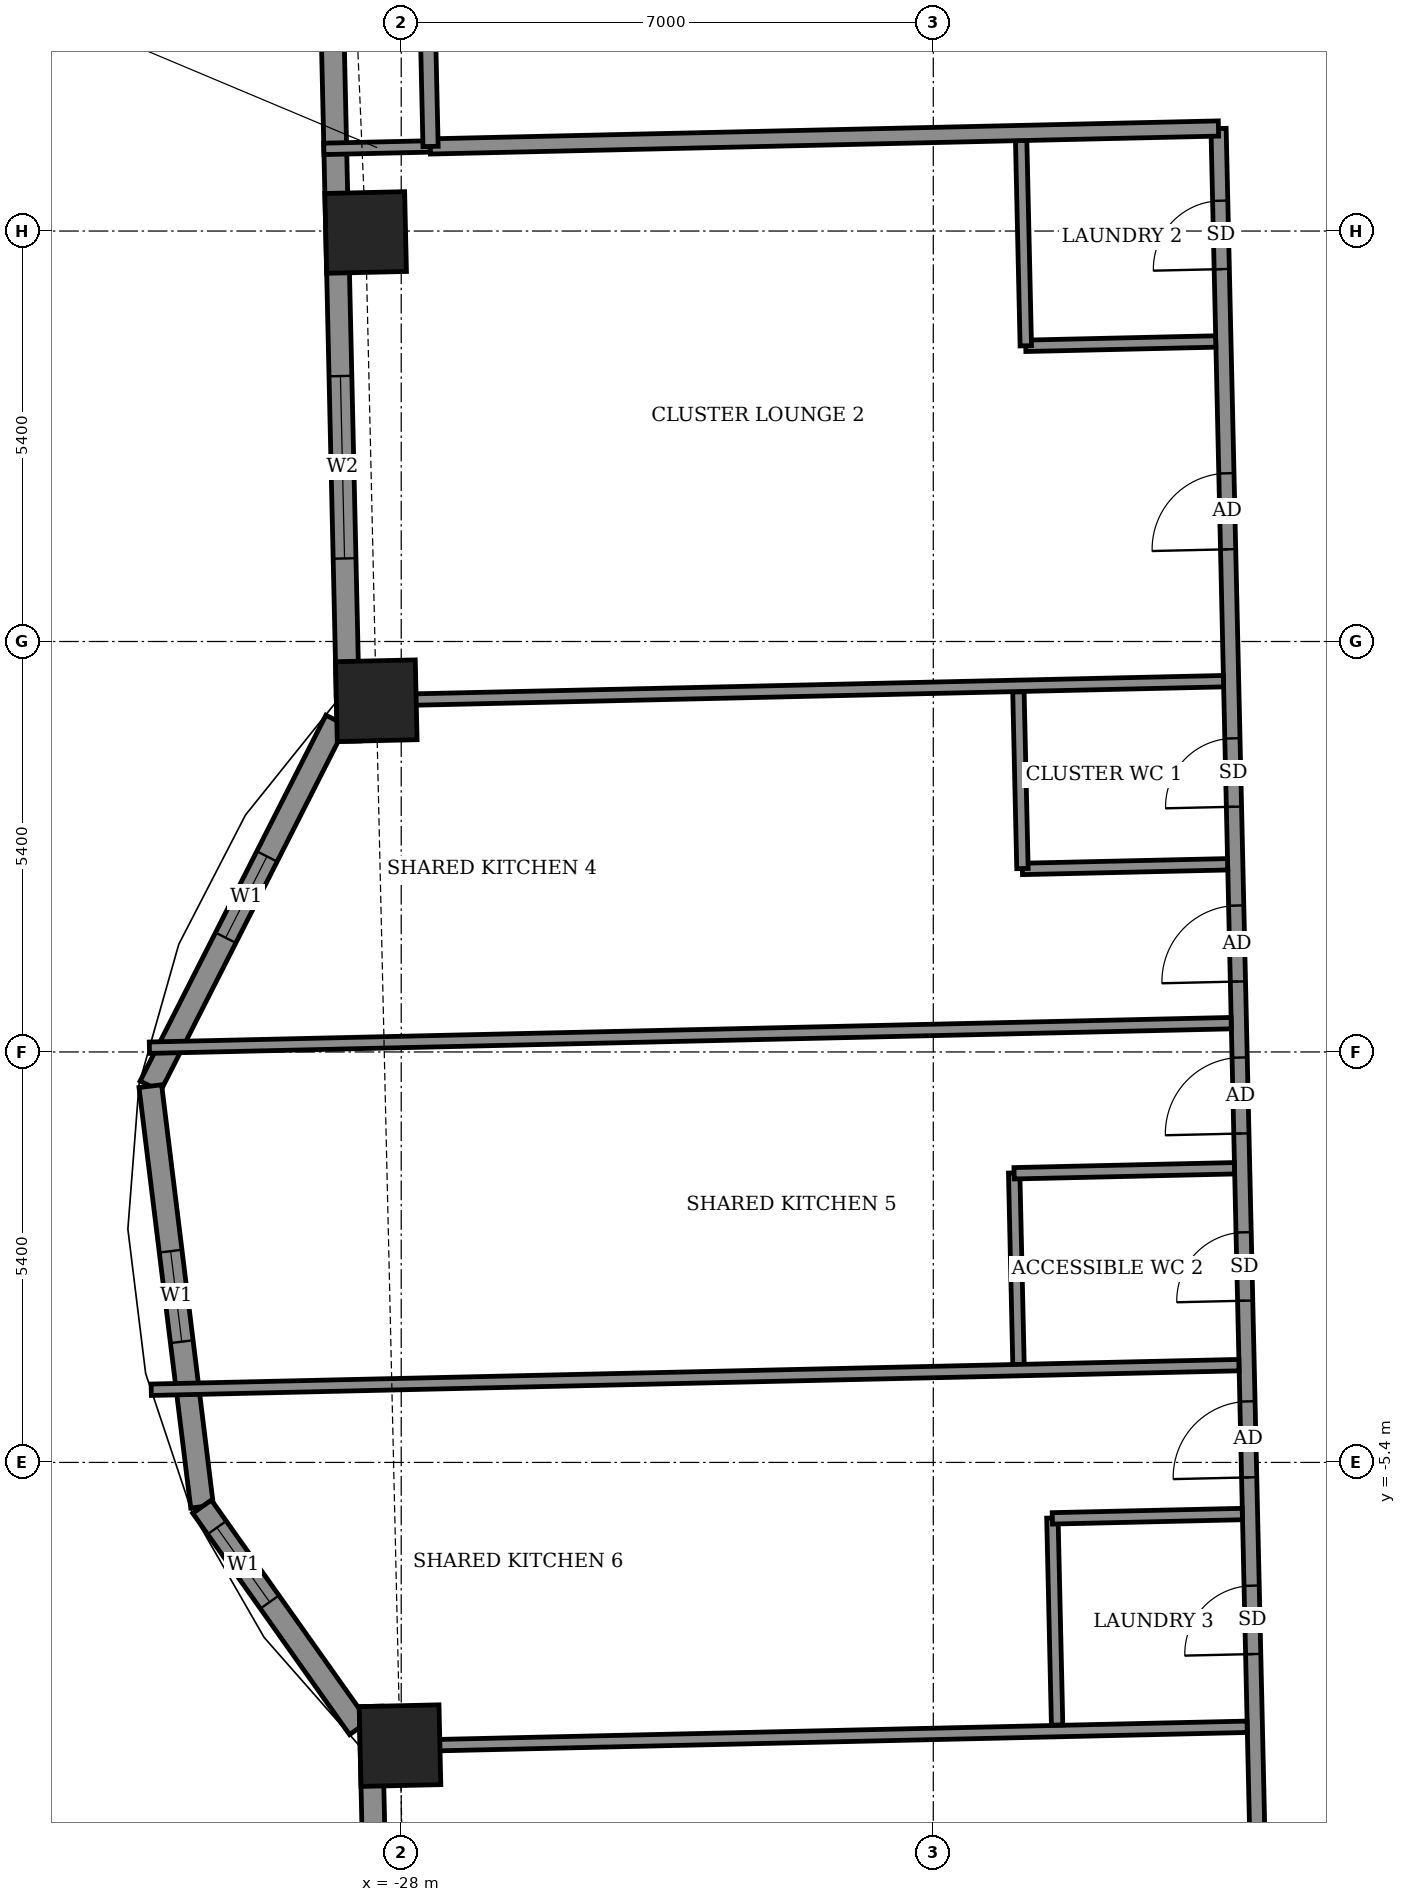
"""IFC4 building model, lengths in metres.
Left out: names, types, materials, properties, quantities, classifications, styles, units other than length and angle.
Written with IfcOpenShell. Run it as: python <this file> out.ifc"""

import sys

from ifc_helpers import new_model, si_unit, direction, frame, frame_2d, origin, origin_2d, place, context, subcontext, project, spatial, rectangle, extrude, element, fill, save


model = new_model("IFC4")
c1 = context("Model", 3, precision=1e-05, world=origin(), true_north=direction((0.0, 1.0)))
c2 = subcontext(c1, "Body", "Model", "MODEL_VIEW")
j1 = project(units=[si_unit("LENGTHUNIT", "METRE"), si_unit("PLANEANGLEUNIT", "RADIAN")], contexts=[c1])
p1 = place(None, origin())
s1 = spatial("IfcSite", under=j1, at=p1, CompositionType="ELEMENT")
p2 = place(p1, origin())
s2 = spatial("IfcBuilding", under=s1, at=p2, CompositionType="ELEMENT")
p3 = place(p2, frame((0.0, 0.0, 241.9)))
s3 = spatial("IfcBuildingStorey", under=s2, at=p3, CompositionType="ELEMENT", Elevation=241.9)
for number, where, z_axis, x_axis in (
    (1, (-28.016, -9.126, -0.55), (0.0, 0.0, 1.0), (0.023, -1.0, 0.0)),
    (2, (-28.468, 10.781, -0.55), (0.0, 0.0, 1.0), (0.023, -1.0, 0.0)),
    (3, (-28.328, 4.621, -0.55), (0.0, 0.0, 1.0), (0.023, -1.0, 0.0)),
):
    element("IfcColumn", number, at=place(p3, frame(where, z_axis=z_axis, x_axis=x_axis)), inside=s3, PredefinedType="COLUMN", context=c2, shape_type="SweptSolid", body=[
        extrude(rectangle(XDim=1.05, YDim=1.05, at=origin_2d()), origin(), (0.0, 0.0, 1.0), 3.6),
    ])
p4 = place(p3, frame((-28.979, 16.784, 0.0), z_axis=(0.0, 0.0, 1.0), x_axis=(0.022685159264, -0.999742658662, 0.0)))
e4 = element("IfcWall", 4, at=p4, inside=s3, PredefinedType="SOLIDWALL", context=c2, shape_type="SweptSolid", body=[
    extrude(rectangle(XDim=12.699, YDim=0.3, at=frame_2d((6.35, 0.0))), origin(), (0.0, 0.0, 1.0), 2.55),
])
p5 = place(p4, frame((2.035, 0.0, 0.0)))
e5 = element("IfcOpeningElement", 5, at=p5, cuts=e4, PredefinedType="OPENING", context=c2, shape_type="SweptSolid", body=[
    extrude(rectangle(XDim=1.5, YDim=2.4, at=frame_2d((0.75, 1.2))), frame((0.0, 0.16, 0.0), z_axis=(0.0, -1.0, 0.0), x_axis=(1.0, 0.0, 0.0)), (0.0, 0.0, 1.0), 0.32),
])
p6 = place(p4, frame((7.894, 0.0, 0.9)))
e6 = element("IfcOpeningElement", 6, at=p6, cuts=e4, PredefinedType="OPENING", context=c2, shape_type="SweptSolid", body=[
    extrude(rectangle(XDim=2.4, YDim=1.5, at=frame_2d((1.2, 0.75))), frame((0.0, 0.16, 0.0), z_axis=(0.0, -1.0, 0.0), x_axis=(1.0, 0.0, 0.0)), (0.0, 0.0, 1.0), 0.32),
])
p7 = place(p3, frame((-28.857, 4.363, 0.0), z_axis=(0.0, 0.0, 1.0), x_axis=(-0.45277700056, -0.891623792731, 0.0)))
e7 = element("IfcWall", 7, at=p7, inside=s3, PredefinedType="SOLIDWALL", context=c2, shape_type="SweptSolid", body=[
    extrude(rectangle(XDim=5.398, YDim=0.3, at=frame_2d((2.699, 0.0))), origin(), (0.0, 0.0, 1.0), 3.05),
])
p8 = place(p7, frame((2.008, 0.0, 0.9)))
e8 = element("IfcOpeningElement", 8, at=p8, cuts=e7, PredefinedType="OPENING", context=c2, shape_type="SweptSolid", body=[
    extrude(rectangle(XDim=1.2, YDim=1.5, at=frame_2d((0.6, 0.75))), frame((0.0, 0.16, 0.0), z_axis=(0.0, -1.0, 0.0), x_axis=(1.0, 0.0, 0.0)), (0.0, 0.0, 1.0), 0.32),
])
p9 = place(p3, frame((-31.301, -0.45, 0.0), z_axis=(0.0, 0.0, 1.0), x_axis=(0.122163831021, -0.992509948761, 0.0)))
e9 = element("IfcWall", 9, at=p9, inside=s3, PredefinedType="SOLIDWALL", context=c2, shape_type="SweptSolid", body=[
    extrude(rectangle(XDim=5.574, YDim=0.3, at=frame_2d((2.787, 0.0))), origin(), (0.0, 0.0, 1.0), 3.05),
])
p10 = place(p9, frame((2.187, 0.0, 0.9)))
e10 = element("IfcOpeningElement", 10, at=p10, cuts=e9, PredefinedType="OPENING", context=c2, shape_type="SweptSolid", body=[
    extrude(rectangle(XDim=1.2, YDim=1.5, at=frame_2d((0.6, 0.75))), frame((0.0, 0.16, 0.0), z_axis=(0.0, -1.0, 0.0), x_axis=(1.0, 0.0, 0.0)), (0.0, 0.0, 1.0), 0.32),
])
p11 = place(p3, frame((-30.62, -5.982, 0.0), z_axis=(0.0, 0.0, 1.0), x_axis=(0.578108441206, -0.815959943996, 0.0)))
e11 = element("IfcWall", 11, at=p11, inside=s3, PredefinedType="SOLIDWALL", context=c2, shape_type="SweptSolid", body=[
    extrude(rectangle(XDim=3.569, YDim=0.3, at=frame_2d((1.784, 0.0))), origin(), (0.0, 0.0, 1.0), 3.05),
])
p12 = place(p11, frame((0.338, 0.0, 0.9)))
e12 = element("IfcOpeningElement", 12, at=p12, cuts=e11, PredefinedType="OPENING", context=c2, shape_type="SweptSolid", body=[
    extrude(rectangle(XDim=1.2, YDim=1.5, at=frame_2d((0.6, 0.75))), frame((0.0, 0.16, 0.0), z_axis=(0.0, -1.0, 0.0), x_axis=(1.0, 0.0, 0.0)), (0.0, 0.0, 1.0), 0.32),
])
p13 = place(p3, frame((-28.403, -8.61, 0.0), z_axis=(0.0, 0.0, 1.0), x_axis=(0.022680342038, -0.999742767958, 0.0)))
e13 = element("IfcWall", 13, at=p13, inside=s3, PredefinedType="SOLIDWALL", context=c2, shape_type="SweptSolid", body=[
    extrude(rectangle(XDim=13.1, YDim=0.3, at=frame_2d((6.55, 0.0))), origin(), (0.0, 0.0, 1.0), 2.55),
])
p14 = place(p13, frame((1.937, 0.0, 0.0)))
e14 = element("IfcOpeningElement", 14, at=p14, cuts=e13, PredefinedType="OPENING", context=c2, shape_type="SweptSolid", body=[
    extrude(rectangle(XDim=1.5, YDim=2.4, at=frame_2d((0.75, 1.2))), frame((0.0, 0.16, 0.0), z_axis=(0.0, -1.0, 0.0), x_axis=(1.0, 0.0, 0.0)), (0.0, 0.0, 1.0), 0.32),
])
p15 = place(p13, frame((8.611, 0.0, 0.9)))
e15 = element("IfcOpeningElement", 15, at=p15, cuts=e13, PredefinedType="OPENING", context=c2, shape_type="SweptSolid", body=[
    extrude(rectangle(XDim=2.4, YDim=1.5, at=frame_2d((1.2, 0.75))), frame((0.0, 0.16, 0.0), z_axis=(0.0, -1.0, 0.0), x_axis=(1.0, 0.0, 0.0)), (0.0, 0.0, 1.0), 0.32),
])
p16 = place(p3, frame((-31.652, 12.672, 0.0), z_axis=(0.0, 0.0, 1.0), x_axis=(-0.022611811187, 0.999744320311, 0.0)))
e16 = element("IfcWall", 16, at=p16, inside=s3, PredefinedType="USERDEFINED", context=c2, shape_type="SweptSolid", body=[
    extrude(rectangle(XDim=4.2, YDim=0.55, at=frame_2d((2.1, 0.0))), origin(), (0.0, 0.0, 1.0), 0.8),
])
p17 = place(p3, frame((-16.678, -12.919, 0.0), z_axis=(0.0, 0.0, 1.0), x_axis=(-0.022696191528, 0.999742408268, 0.0)))
e17 = element("IfcWall", 17, at=p17, inside=s3, PredefinedType="PARTITIONING", context=c2, shape_type="SweptSolid", body=[
    extrude(rectangle(XDim=25.074, YDim=0.2, at=frame_2d((12.537, 0.0))), origin(), (0.0, 0.0, 1.0), 3.05),
])
p18 = place(p17, frame((19.537, 0.0, 0.0)))
e18 = element("IfcOpeningElement", 18, at=p18, cuts=e17, PredefinedType="OPENING", context=c2, shape_type="SweptSolid", body=[
    extrude(rectangle(XDim=1.0, YDim=2.1, at=frame_2d((0.5, 1.05))), frame((0.0, 0.11, 0.0), z_axis=(0.0, -1.0, 0.0), x_axis=(1.0, 0.0, 0.0)), (0.0, 0.0, 1.0), 0.22),
])
p19 = place(p17, frame((23.224, 0.0, 0.0)))
e19 = element("IfcOpeningElement", 19, at=p19, cuts=e17, PredefinedType="OPENING", context=c2, shape_type="SweptSolid", body=[
    extrude(rectangle(XDim=0.9, YDim=2.1, at=frame_2d((0.45, 1.05))), frame((0.0, 0.11, 0.0), z_axis=(0.0, -1.0, 0.0), x_axis=(1.0, 0.0, 0.0)), (0.0, 0.0, 1.0), 0.22),
])
p20 = place(p17, frame((13.849, 0.0, 0.0)))
e20 = element("IfcOpeningElement", 20, at=p20, cuts=e17, PredefinedType="OPENING", context=c2, shape_type="SweptSolid", body=[
    extrude(rectangle(XDim=1.0, YDim=2.1, at=frame_2d((0.5, 1.05))), frame((0.0, 0.11, 0.0), z_axis=(0.0, -1.0, 0.0), x_axis=(1.0, 0.0, 0.0)), (0.0, 0.0, 1.0), 0.22),
])
p21 = place(p17, frame((16.149, 0.0, 0.0)))
e21 = element("IfcOpeningElement", 21, at=p21, cuts=e17, PredefinedType="OPENING", context=c2, shape_type="SweptSolid", body=[
    extrude(rectangle(XDim=0.9, YDim=2.1, at=frame_2d((0.45, 1.05))), frame((0.0, 0.11, 0.0), z_axis=(0.0, -1.0, 0.0), x_axis=(1.0, 0.0, 0.0)), (0.0, 0.0, 1.0), 0.22),
])
p22 = place(p17, frame((11.849, 0.0, 0.0)))
e22 = element("IfcOpeningElement", 22, at=p22, cuts=e17, PredefinedType="OPENING", context=c2, shape_type="SweptSolid", body=[
    extrude(rectangle(XDim=1.0, YDim=2.1, at=frame_2d((0.5, 1.05))), frame((0.0, 0.11, 0.0), z_axis=(0.0, -1.0, 0.0), x_axis=(1.0, 0.0, 0.0)), (0.0, 0.0, 1.0), 0.22),
])
p23 = place(p17, frame((9.649, 0.0, 0.0)))
e23 = element("IfcOpeningElement", 23, at=p23, cuts=e17, PredefinedType="OPENING", context=c2, shape_type="SweptSolid", body=[
    extrude(rectangle(XDim=0.9, YDim=2.1, at=frame_2d((0.45, 1.05))), frame((0.0, 0.11, 0.0), z_axis=(0.0, -1.0, 0.0), x_axis=(1.0, 0.0, 0.0)), (0.0, 0.0, 1.0), 0.22),
])
p24 = place(p17, frame((7.324, 0.0, 0.0)))
e24 = element("IfcOpeningElement", 24, at=p24, cuts=e17, PredefinedType="OPENING", context=c2, shape_type="SweptSolid", body=[
    extrude(rectangle(XDim=1.0, YDim=2.1, at=frame_2d((0.5, 1.05))), frame((0.0, 0.11, 0.0), z_axis=(0.0, -1.0, 0.0), x_axis=(1.0, 0.0, 0.0)), (0.0, 0.0, 1.0), 0.22),
])
p25 = place(p17, frame((4.999, 0.0, 0.0)))
e25 = element("IfcOpeningElement", 25, at=p25, cuts=e17, PredefinedType="OPENING", context=c2, shape_type="SweptSolid", body=[
    extrude(rectangle(XDim=0.9, YDim=2.1, at=frame_2d((0.45, 1.05))), frame((0.0, 0.11, 0.0), z_axis=(0.0, -1.0, 0.0), x_axis=(1.0, 0.0, 0.0)), (0.0, 0.0, 1.0), 0.22),
])
p26 = place(p3, frame((-28.241, -9.136, 0.0), z_axis=(0.0, 0.0, 1.0), x_axis=(0.999742533279, 0.022690684282, 0.0)))
e26 = element("IfcWall", 26, at=p26, inside=s3, PredefinedType="PARTITIONING", context=c2, shape_type="SweptSolid", body=[
    extrude(rectangle(XDim=11.373, YDim=0.15, at=frame_2d((5.687, 0.0))), origin(), (0.0, 0.0, 1.0), 3.05),
])
p27 = place(p3, frame((-19.371, -8.855, 0.0), z_axis=(0.0, 0.0, 1.0), x_axis=(-0.022760079124, 0.999740955847, 0.0)))
e27 = element("IfcWall", 27, at=p27, inside=s3, PredefinedType="PARTITIONING", context=c2, shape_type="SweptSolid", body=[
    extrude(rectangle(XDim=2.725, YDim=0.15, at=frame_2d((1.362, 0.0))), origin(), (0.0, 0.0, 1.0), 3.05),
])
p28 = place(p3, frame((-19.434, -6.136, 0.0), z_axis=(0.0, 0.0, 1.0), x_axis=(0.999741230352, 0.02274801823, 0.0)))
e28 = element("IfcWall", 28, at=p28, inside=s3, PredefinedType="PARTITIONING", context=c2, shape_type="SweptSolid", body=[
    extrude(rectangle(XDim=2.501, YDim=0.15, at=frame_2d((1.25, 0.0))), origin(), (0.0, 0.0, 1.0), 3.05),
])
p29 = place(p3, frame((-19.879, -4.115, 0.0), z_axis=(0.0, 0.0, 1.0), x_axis=(-0.022629142889, 0.99974392816, 0.0)))
e29 = element("IfcWall", 29, at=p29, inside=s3, PredefinedType="PARTITIONING", context=c2, shape_type="SweptSolid", body=[
    extrude(rectangle(XDim=2.525, YDim=0.15, at=frame_2d((1.262, 0.0))), origin(), (0.0, 0.0, 1.0), 3.05),
])
p30 = place(p3, frame((-31.289, -4.444, 0.0), z_axis=(0.0, 0.0, 1.0), x_axis=(0.99974382177, 0.022633842623, 0.0)))
e30 = element("IfcWall", 30, at=p30, inside=s3, PredefinedType="PARTITIONING", context=c2, shape_type="SweptSolid", body=[
    extrude(rectangle(XDim=14.314, YDim=0.15, at=frame_2d((7.157, 0.0))), origin(), (0.0, 0.0, 1.0), 2.1),
])
p31 = place(p3, frame((-19.937, -1.596, 0.0), z_axis=(0.0, 0.0, 1.0), x_axis=(0.999741574676, 0.022732880677, 0.0)))
e31 = element("IfcWall", 31, at=p31, inside=s3, PredefinedType="PARTITIONING", context=c2, shape_type="SweptSolid", body=[
    extrude(rectangle(XDim=2.9, YDim=0.15, at=frame_2d((1.45, 0.0))), origin(), (0.0, 0.0, 1.0), 3.05),
])
p32 = place(p3, frame((-31.313, 0.056, 0.0), z_axis=(0.0, 0.0, 1.0), x_axis=(0.999742561055, 0.022689460464, 0.0)))
e32 = element("IfcWall", 32, at=p32, inside=s3, PredefinedType="PARTITIONING", context=c2, shape_type="SweptSolid", body=[
    extrude(rectangle(XDim=14.236, YDim=0.15, at=frame_2d((7.118, 0.0))), origin(), (0.0, 0.0, 1.0), 2.1),
])
p33 = place(p3, frame((-19.828, 2.408, 0.0), z_axis=(0.0, 0.0, 1.0), x_axis=(0.99974458177, 0.022600248254, 0.0)))
e33 = element("IfcWall", 33, at=p33, inside=s3, PredefinedType="PARTITIONING", context=c2, shape_type="SweptSolid", body=[
    extrude(rectangle(XDim=2.701, YDim=0.15, at=frame_2d((1.35, 0.0))), origin(), (0.0, 0.0, 1.0), 3.05),
])
p34 = place(p3, frame((-19.827, 2.413, 0.0), z_axis=(0.0, 0.0, 1.0), x_axis=(-0.02279059109, 0.999740260747, 0.0)))
e34 = element("IfcWall", 34, at=p34, inside=s3, PredefinedType="PARTITIONING", context=c2, shape_type="SweptSolid", body=[
    extrude(rectangle(XDim=2.324, YDim=0.15, at=frame_2d((1.162, 0.0))), origin(), (0.0, 0.0, 1.0), 3.05),
])
p35 = place(p3, frame((-28.853, 4.613, 0.0), z_axis=(0.0, 0.0, 1.0), x_axis=(0.999742483, 0.022692899457, 0.0)))
e35 = element("IfcWall", 35, at=p35, inside=s3, PredefinedType="PARTITIONING", context=c2, shape_type="SweptSolid", body=[
    extrude(rectangle(XDim=11.673, YDim=0.15, at=frame_2d((5.836, 0.0))), origin(), (0.0, 0.0, 1.0), 3.05),
])
p36 = place(p3, frame((-19.784, 9.29, 0.0), z_axis=(0.0, 0.0, 1.0), x_axis=(0.999741028149, 0.022756903044, 0.0)))
e36 = element("IfcWall", 36, at=p36, inside=s3, PredefinedType="PARTITIONING", context=c2, shape_type="SweptSolid", body=[
    extrude(rectangle(XDim=2.5, YDim=0.15, at=frame_2d((1.25, 0.0))), origin(), (0.0, 0.0, 1.0), 3.05),
])
p37 = place(p3, frame((-19.783, 9.29, 0.0), z_axis=(0.0, 0.0, 1.0), x_axis=(-0.022600248254, 0.99974458177, 0.0)))
e37 = element("IfcWall", 37, at=p37, inside=s3, PredefinedType="PARTITIONING", context=c2, shape_type="SweptSolid", body=[
    extrude(rectangle(XDim=2.701, YDim=0.15, at=frame_2d((1.35, 0.0))), origin(), (0.0, 0.0, 1.0), 3.05),
])
p38 = place(p3, frame((-29.018, 11.881, 0.0), z_axis=(0.0, 0.0, 1.0), x_axis=(0.999740667531, 0.022772739949, 0.0)))
e38 = element("IfcWall", 38, at=p38, inside=s3, PredefinedType="PARTITIONING", context=c2, shape_type="SweptSolid", body=[
    extrude(rectangle(XDim=1.404, YDim=0.15, at=frame_2d((0.702, 0.0))), origin(), (0.0, 0.0, 1.0), 2.55),
])
p39 = place(p3, frame((-27.618, 11.913, 0.0), z_axis=(0.0, 0.0, 1.0), x_axis=(0.999741483035, 0.022736910479, 0.0)))
e39 = element("IfcWall", 39, at=p39, inside=s3, PredefinedType="PARTITIONING", context=c2, shape_type="SweptSolid", body=[
    extrude(rectangle(XDim=10.373, YDim=0.2, at=frame_2d((5.186, 0.0))), origin(), (0.0, 0.0, 1.0), 3.05),
])
p40 = place(p3, frame((-27.614, 11.913, 0.0), z_axis=(0.0, 0.0, 1.0), x_axis=(-0.022617910375, 0.999744182344, 0.0)))
e40 = element("IfcWall", 40, at=p40, inside=s3, PredefinedType="PARTITIONING", context=c2, shape_type="SweptSolid", body=[
    extrude(rectangle(XDim=1.5, YDim=0.2, at=frame_2d((0.75, 0.0))), origin(), (0.0, 0.0, 1.0), 3.05),
])
p41 = place(p6, origin())
e41 = element("IfcWindow", 41, at=p41, inside=s3, PartitioningType="DOUBLE_PANEL_VERTICAL", PredefinedType="WINDOW", context=c2, shape_type="SweptSolid", body=[
    extrude(rectangle(XDim=2.4, YDim=1.5, at=frame_2d((1.2, 0.75))), frame((0.0, 0.03, 0.0), z_axis=(0.0, -1.0, 0.0), x_axis=(1.0, 0.0, 0.0)), (0.0, 0.0, 1.0), 0.06),
])
fill(e6, e41)
p42 = place(p8, origin())
e42 = element("IfcWindow", 42, at=p42, inside=s3, PartitioningType="SINGLE_PANEL", PredefinedType="WINDOW", context=c2, shape_type="SweptSolid", body=[
    extrude(rectangle(XDim=1.2, YDim=1.5, at=frame_2d((0.6, 0.75))), frame((0.0, 0.03, 0.0), z_axis=(0.0, -1.0, 0.0), x_axis=(1.0, 0.0, 0.0)), (0.0, 0.0, 1.0), 0.06),
])
fill(e8, e42)
p43 = place(p10, origin())
e43 = element("IfcWindow", 43, at=p43, inside=s3, PartitioningType="SINGLE_PANEL", PredefinedType="WINDOW", context=c2, shape_type="SweptSolid", body=[
    extrude(rectangle(XDim=1.2, YDim=1.5, at=frame_2d((0.6, 0.75))), frame((0.0, 0.03, 0.0), z_axis=(0.0, -1.0, 0.0), x_axis=(1.0, 0.0, 0.0)), (0.0, 0.0, 1.0), 0.06),
])
fill(e10, e43)
p44 = place(p12, origin())
e44 = element("IfcWindow", 44, at=p44, inside=s3, PartitioningType="SINGLE_PANEL", PredefinedType="WINDOW", context=c2, shape_type="SweptSolid", body=[
    extrude(rectangle(XDim=1.2, YDim=1.5, at=frame_2d((0.6, 0.75))), frame((0.0, 0.03, 0.0), z_axis=(0.0, -1.0, 0.0), x_axis=(1.0, 0.0, 0.0)), (0.0, 0.0, 1.0), 0.06),
])
fill(e12, e44)
p45 = place(p18, origin())
e45 = element("IfcDoor", 45, at=p45, inside=s3, OperationType="SINGLE_SWING_LEFT", PredefinedType="DOOR", context=c2, shape_type="SweptSolid", body=[
    extrude(rectangle(XDim=1.0, YDim=2.1, at=frame_2d((0.5, 1.05))), frame((0.0, 0.025, 0.0), z_axis=(0.0, -1.0, 0.0), x_axis=(1.0, 0.0, 0.0)), (0.0, 0.0, 1.0), 0.05),
])
fill(e18, e45)
p46 = place(p19, origin())
e46 = element("IfcDoor", 46, at=p46, inside=s3, OperationType="SINGLE_SWING_LEFT", PredefinedType="DOOR", context=c2, shape_type="SweptSolid", body=[
    extrude(rectangle(XDim=0.9, YDim=2.1, at=frame_2d((0.45, 1.05))), frame((0.0, 0.025, 0.0), z_axis=(0.0, -1.0, 0.0), x_axis=(1.0, 0.0, 0.0)), (0.0, 0.0, 1.0), 0.05),
])
fill(e19, e46)
p47 = place(p20, origin())
e47 = element("IfcDoor", 47, at=p47, inside=s3, OperationType="SINGLE_SWING_RIGHT", PredefinedType="DOOR", context=c2, shape_type="SweptSolid", body=[
    extrude(rectangle(XDim=1.0, YDim=2.1, at=frame_2d((0.5, 1.05))), frame((0.0, 0.025, 0.0), z_axis=(0.0, -1.0, 0.0), x_axis=(1.0, 0.0, 0.0)), (0.0, 0.0, 1.0), 0.05),
])
fill(e20, e47)
p48 = place(p21, origin())
e48 = element("IfcDoor", 48, at=p48, inside=s3, OperationType="SINGLE_SWING_RIGHT", PredefinedType="DOOR", context=c2, shape_type="SweptSolid", body=[
    extrude(rectangle(XDim=0.9, YDim=2.1, at=frame_2d((0.45, 1.05))), frame((0.0, 0.025, 0.0), z_axis=(0.0, -1.0, 0.0), x_axis=(1.0, 0.0, 0.0)), (0.0, 0.0, 1.0), 0.05),
])
fill(e21, e48)
p49 = place(p22, origin())
e49 = element("IfcDoor", 49, at=p49, inside=s3, OperationType="SINGLE_SWING_LEFT", PredefinedType="DOOR", context=c2, shape_type="SweptSolid", body=[
    extrude(rectangle(XDim=1.0, YDim=2.1, at=frame_2d((0.5, 1.05))), frame((0.0, 0.025, 0.0), z_axis=(0.0, -1.0, 0.0), x_axis=(1.0, 0.0, 0.0)), (0.0, 0.0, 1.0), 0.05),
])
fill(e22, e49)
p50 = place(p23, origin())
e50 = element("IfcDoor", 50, at=p50, inside=s3, OperationType="SINGLE_SWING_LEFT", PredefinedType="DOOR", context=c2, shape_type="SweptSolid", body=[
    extrude(rectangle(XDim=0.9, YDim=2.1, at=frame_2d((0.45, 1.05))), frame((0.0, 0.025, 0.0), z_axis=(0.0, -1.0, 0.0), x_axis=(1.0, 0.0, 0.0)), (0.0, 0.0, 1.0), 0.05),
])
fill(e23, e50)
p51 = place(p24, origin())
e51 = element("IfcDoor", 51, at=p51, inside=s3, OperationType="SINGLE_SWING_RIGHT", PredefinedType="DOOR", context=c2, shape_type="SweptSolid", body=[
    extrude(rectangle(XDim=1.0, YDim=2.1, at=frame_2d((0.5, 1.05))), frame((0.0, 0.025, 0.0), z_axis=(0.0, -1.0, 0.0), x_axis=(1.0, 0.0, 0.0)), (0.0, 0.0, 1.0), 0.05),
])
fill(e24, e51)
p52 = place(p25, origin())
e52 = element("IfcDoor", 52, at=p52, inside=s3, OperationType="SINGLE_SWING_RIGHT", PredefinedType="DOOR", context=c2, shape_type="SweptSolid", body=[
    extrude(rectangle(XDim=0.9, YDim=2.1, at=frame_2d((0.45, 1.05))), frame((0.0, 0.025, 0.0), z_axis=(0.0, -1.0, 0.0), x_axis=(1.0, 0.0, 0.0)), (0.0, 0.0, 1.0), 0.05),
])
fill(e25, e52)
save(model, sys.argv[1])
